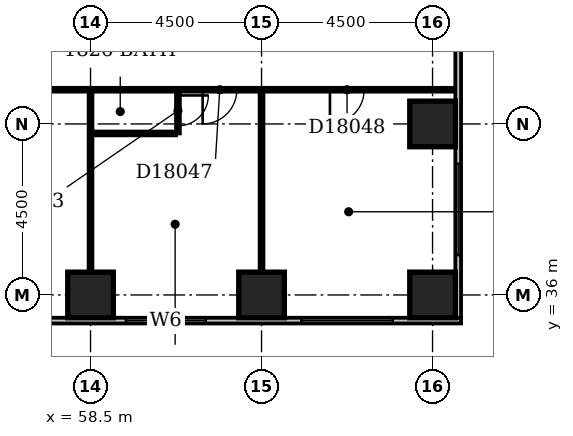
"""IFC4 building model, lengths in metres.
Left out: names, types, materials, properties, quantities, classifications, styles, units other than length and angle.
Written with IfcOpenShell. Run it as: python <this file> out.ifc"""

import sys

from ifc_helpers import new_model, si_unit, direction, frame, frame_2d, origin, origin_2d, place, context, subcontext, project, spatial, rectangle, extrude, element, fill, save


model = new_model("IFC4")
c1 = context("Model", 3, precision=1e-05, world=origin(), true_north=direction((0.0, 1.0)))
c2 = subcontext(c1, "Body", "Model", "MODEL_VIEW")
j1 = project(units=[si_unit("LENGTHUNIT", "METRE"), si_unit("PLANEANGLEUNIT", "RADIAN")], contexts=[c1])
p1 = place(None, origin())
s1 = spatial("IfcSite", under=j1, at=p1, CompositionType="ELEMENT")
p2 = place(p1, origin())
s2 = spatial("IfcBuilding", under=s1, at=p2, CompositionType="ELEMENT")
p3 = place(p2, frame((0.0, 0.0, 75.8)))
s3 = spatial("IfcBuildingStorey", under=s2, at=p3, CompositionType="ELEMENT", Elevation=75.8)
for number, where, z_axis, x_axis in (
    (1, (58.5, 36.0, -0.3), (0.0, 0.0, 1.0), (1.0, 0.0, 0.0)),
    (2, (63.0, 36.0, -0.3), (0.0, 0.0, 1.0), (1.0, 0.0, 0.0)),
    (3, (67.5, 36.0, -0.3), (0.0, 0.0, 1.0), (1.0, 0.0, 0.0)),
    (4, (67.5, 40.5, -0.3), (0.0, 0.0, 1.0), (1.0, 0.0, 0.0)),
):
    element("IfcColumn", number, at=place(p3, frame(where, z_axis=z_axis, x_axis=x_axis)), inside=s3, PredefinedType="COLUMN", context=c2, shape_type="SweptSolid", body=[
        extrude(rectangle(XDim=1.2, YDim=1.2, at=origin_2d()), origin(), (0.0, 0.0, 1.0), 3.6),
    ])
p4 = place(p3, frame((23.1, 35.325, 0.0), z_axis=(0.0, 0.0, 1.0), x_axis=(1.0, 0.0, 0.0)))
e5 = element("IfcWall", 5, at=p4, inside=s3, PredefinedType="STANDARD", context=c2, shape_type="SweptSolid", body=[
    extrude(rectangle(XDim=45.15, YDim=0.15, at=frame_2d((22.575, 0.0))), origin(), (0.0, 0.0, 1.0), 2.7),
])
p5 = place(p4, frame((0.45, 0.0, 0.6)))
e6 = element("IfcOpeningElement", 6, at=p5, cuts=e5, PredefinedType="OPENING", context=c2, shape_type="SweptSolid", body=[
    extrude(rectangle(XDim=2.4, YDim=1.8, at=frame_2d((1.2, 0.9))), frame((0.0, 0.087, 0.0), z_axis=(0.0, -1.0, 0.0), x_axis=(1.0, 0.0, 0.0)), (0.0, 0.0, 1.0), 0.174),
])
p6 = place(p4, frame((4.95, 0.0, 0.6)))
e7 = element("IfcOpeningElement", 7, at=p6, cuts=e5, PredefinedType="OPENING", context=c2, shape_type="SweptSolid", body=[
    extrude(rectangle(XDim=2.4, YDim=1.8, at=frame_2d((1.2, 0.9))), frame((0.0, 0.087, 0.0), z_axis=(0.0, -1.0, 0.0), x_axis=(1.0, 0.0, 0.0)), (0.0, 0.0, 1.0), 0.174),
])
p7 = place(p4, frame((10.548, 0.0, 0.6)))
e8 = element("IfcOpeningElement", 8, at=p7, cuts=e5, PredefinedType="OPENING", context=c2, shape_type="SweptSolid", body=[
    extrude(rectangle(XDim=1.5, YDim=1.8, at=frame_2d((0.75, 0.9))), frame((0.0, 0.087, 0.0), z_axis=(0.0, -1.0, 0.0), x_axis=(1.0, 0.0, 0.0)), (0.0, 0.0, 1.0), 0.174),
])
p8 = place(p4, frame((13.71, 0.0, 0.6)))
e9 = element("IfcOpeningElement", 9, at=p8, cuts=e5, PredefinedType="OPENING", context=c2, shape_type="SweptSolid", body=[
    extrude(rectangle(XDim=1.8, YDim=1.8, at=frame_2d((0.9, 0.9))), frame((0.0, 0.087, 0.0), z_axis=(0.0, -1.0, 0.0), x_axis=(1.0, 0.0, 0.0)), (0.0, 0.0, 1.0), 0.174),
])
p9 = place(p4, frame((18.45, 0.0, 0.6)))
e10 = element("IfcOpeningElement", 10, at=p9, cuts=e5, PredefinedType="OPENING", context=c2, shape_type="SweptSolid", body=[
    extrude(rectangle(XDim=2.4, YDim=1.8, at=frame_2d((1.2, 0.9))), frame((0.0, 0.087, 0.0), z_axis=(0.0, -1.0, 0.0), x_axis=(1.0, 0.0, 0.0)), (0.0, 0.0, 1.0), 0.174),
])
p10 = place(p4, frame((22.95, 0.0, 0.6)))
e11 = element("IfcOpeningElement", 11, at=p10, cuts=e5, PredefinedType="OPENING", context=c2, shape_type="SweptSolid", body=[
    extrude(rectangle(XDim=2.4, YDim=1.8, at=frame_2d((1.2, 0.9))), frame((0.0, 0.087, 0.0), z_axis=(0.0, -1.0, 0.0), x_axis=(1.0, 0.0, 0.0)), (0.0, 0.0, 1.0), 0.174),
])
p11 = place(p4, frame((27.45, 0.0, 0.6)))
e12 = element("IfcOpeningElement", 12, at=p11, cuts=e5, PredefinedType="OPENING", context=c2, shape_type="SweptSolid", body=[
    extrude(rectangle(XDim=2.4, YDim=1.8, at=frame_2d((1.2, 0.9))), frame((0.0, 0.087, 0.0), z_axis=(0.0, -1.0, 0.0), x_axis=(1.0, 0.0, 0.0)), (0.0, 0.0, 1.0), 0.174),
])
p12 = place(p4, frame((31.95, 0.0, 0.6)))
e13 = element("IfcOpeningElement", 13, at=p12, cuts=e5, PredefinedType="OPENING", context=c2, shape_type="SweptSolid", body=[
    extrude(rectangle(XDim=2.4, YDim=1.8, at=frame_2d((1.2, 0.9))), frame((0.0, 0.087, 0.0), z_axis=(0.0, -1.0, 0.0), x_axis=(1.0, 0.0, 0.0)), (0.0, 0.0, 1.0), 0.174),
])
p13 = place(p4, frame((36.331, 0.0, 0.6)))
e14 = element("IfcOpeningElement", 14, at=p13, cuts=e5, PredefinedType="OPENING", context=c2, shape_type="SweptSolid", body=[
    extrude(rectangle(XDim=2.1, YDim=1.8, at=frame_2d((1.05, 0.9))), frame((0.0, 0.087, 0.0), z_axis=(0.0, -1.0, 0.0), x_axis=(1.0, 0.0, 0.0)), (0.0, 0.0, 1.0), 0.174),
])
p14 = place(p4, frame((40.95, 0.0, 0.6)))
e15 = element("IfcOpeningElement", 15, at=p14, cuts=e5, PredefinedType="OPENING", context=c2, shape_type="SweptSolid", body=[
    extrude(rectangle(XDim=2.4, YDim=1.8, at=frame_2d((1.2, 0.9))), frame((0.0, 0.087, 0.0), z_axis=(0.0, -1.0, 0.0), x_axis=(1.0, 0.0, 0.0)), (0.0, 0.0, 1.0), 0.174),
])
p15 = place(p3, frame((68.175, 35.4, 0.0), z_axis=(0.0, 0.0, 1.0), x_axis=(0.0, 1.0, 0.0)))
e16 = element("IfcWall", 16, at=p15, inside=s3, PredefinedType="STANDARD", context=c2, shape_type="SweptSolid", body=[
    extrude(rectangle(XDim=23.85, YDim=0.15, at=frame_2d((11.925, 0.0))), origin(), (0.0, 0.0, 1.0), 2.7),
])
p16 = place(p15, frame((1.65, 0.0, 0.6)))
e17 = element("IfcOpeningElement", 17, at=p16, cuts=e16, PredefinedType="OPENING", context=c2, shape_type="SweptSolid", body=[
    extrude(rectangle(XDim=2.4, YDim=1.8, at=frame_2d((1.2, 0.9))), frame((0.0, 0.087, 0.0), z_axis=(0.0, -1.0, 0.0), x_axis=(1.0, 0.0, 0.0)), (0.0, 0.0, 1.0), 0.174),
])
p17 = place(p15, frame((11.49, 0.0, 0.6)))
e18 = element("IfcOpeningElement", 18, at=p17, cuts=e16, PredefinedType="OPENING", context=c2, shape_type="SweptSolid", body=[
    extrude(rectangle(XDim=1.8, YDim=1.8, at=frame_2d((0.9, 0.9))), frame((0.0, 0.087, 0.0), z_axis=(0.0, -1.0, 0.0), x_axis=(1.0, 0.0, 0.0)), (0.0, 0.0, 1.0), 0.174),
])
p18 = place(p15, frame((19.65, 0.0, 0.6)))
e19 = element("IfcOpeningElement", 19, at=p18, cuts=e16, PredefinedType="OPENING", context=c2, shape_type="SweptSolid", body=[
    extrude(rectangle(XDim=2.4, YDim=1.8, at=frame_2d((1.2, 0.9))), frame((0.0, 0.087, 0.0), z_axis=(0.0, -1.0, 0.0), x_axis=(1.0, 0.0, 0.0)), (0.0, 0.0, 1.0), 0.174),
])
p19 = place(p3, frame((58.5, 36.6, 0.0), z_axis=(0.0, 0.0, 1.0), x_axis=(0.0, 1.0, 0.0)))
e20 = element("IfcWall", 20, at=p19, inside=s3, PredefinedType="PARTITIONING", context=c2, shape_type="SweptSolid", body=[
    extrude(rectangle(XDim=4.75, YDim=0.1, at=frame_2d((2.375, 0.0))), origin(), (0.0, 0.0, 1.0), 3.3),
])
p20 = place(p3, frame((63.0, 36.6, 0.0), z_axis=(0.0, 0.0, 1.0), x_axis=(0.0, 1.0, 0.0)))
e21 = element("IfcWall", 21, at=p20, inside=s3, PredefinedType="PARTITIONING", context=c2, shape_type="SweptSolid", body=[
    extrude(rectangle(XDim=4.75, YDim=0.1, at=frame_2d((2.375, 0.0))), origin(), (0.0, 0.0, 1.0), 2.4),
])
p21 = place(p3, frame((58.55, 40.25, 0.0), z_axis=(0.0, 0.0, 1.0), x_axis=(1.0, 0.0, 0.0)))
e22 = element("IfcWall", 22, at=p21, inside=s3, PredefinedType="PLUMBINGWALL", context=c2, shape_type="SweptSolid", body=[
    extrude(rectangle(XDim=2.2, YDim=0.1, at=frame_2d((1.1, 0.0))), origin(), (0.0, 0.0, 1.0), 3.3),
])
p22 = place(p3, frame((60.8, 40.25, 0.0), z_axis=(0.0, 0.0, 1.0), x_axis=(0.0, 1.0, 0.0)))
e23 = element("IfcWall", 23, at=p22, inside=s3, PredefinedType="PLUMBINGWALL", context=c2, shape_type="SweptSolid", body=[
    extrude(rectangle(XDim=1.1, YDim=0.1, at=frame_2d((0.55, 0.0))), origin(), (0.0, 0.0, 1.0), 3.3),
])
p23 = place(p22, frame((0.2, 0.0, 0.0)))
e24 = element("IfcOpeningElement", 24, at=p23, cuts=e23, PredefinedType="OPENING", context=c2, shape_type="SweptSolid", body=[
    extrude(rectangle(XDim=0.8, YDim=2.1, at=frame_2d((0.4, 1.05))), frame((0.0, 0.062, 0.0), z_axis=(0.0, -1.0, 0.0), x_axis=(1.0, 0.0, 0.0)), (0.0, 0.0, 1.0), 0.124),
])
p24 = place(p3, frame((49.6, 41.4, 0.0), z_axis=(0.0, 0.0, 1.0), x_axis=(1.0, 0.0, 0.0)))
e25 = element("IfcWall", 25, at=p24, inside=s3, PredefinedType="PARTITIONING", context=c2, shape_type="SweptSolid", body=[
    extrude(rectangle(XDim=18.5, YDim=0.1, at=frame_2d((9.25, 0.0))), origin(), (0.0, 0.0, 1.0), 3.3),
])
p25 = place(p24, frame((1.7, 0.0, 0.0)))
e26 = element("IfcOpeningElement", 26, at=p25, cuts=e25, PredefinedType="OPENING", context=c2, shape_type="SweptSolid", body=[
    extrude(rectangle(XDim=0.9, YDim=2.1, at=frame_2d((0.45, 1.05))), frame((0.0, 0.062, 0.0), z_axis=(0.0, -1.0, 0.0), x_axis=(1.0, 0.0, 0.0)), (0.0, 0.0, 1.0), 0.124),
])
p26 = place(p24, frame((6.2, 0.0, 0.0)))
e27 = element("IfcOpeningElement", 27, at=p26, cuts=e25, PredefinedType="OPENING", context=c2, shape_type="SweptSolid", body=[
    extrude(rectangle(XDim=0.9, YDim=2.1, at=frame_2d((0.45, 1.05))), frame((0.0, 0.062, 0.0), z_axis=(0.0, -1.0, 0.0), x_axis=(1.0, 0.0, 0.0)), (0.0, 0.0, 1.0), 0.124),
])
p27 = place(p24, frame((11.85, 0.0, 0.0)))
e28 = element("IfcOpeningElement", 28, at=p27, cuts=e25, PredefinedType="OPENING", context=c2, shape_type="SweptSolid", body=[
    extrude(rectangle(XDim=0.9, YDim=2.1, at=frame_2d((0.45, 1.05))), frame((0.0, 0.062, 0.0), z_axis=(0.0, -1.0, 0.0), x_axis=(1.0, 0.0, 0.0)), (0.0, 0.0, 1.0), 0.124),
])
p28 = place(p24, frame((15.2, 0.0, 0.0)))
e29 = element("IfcOpeningElement", 29, at=p28, cuts=e25, PredefinedType="OPENING", context=c2, shape_type="SweptSolid", body=[
    extrude(rectangle(XDim=0.9, YDim=2.1, at=frame_2d((0.45, 1.05))), frame((0.0, 0.062, 0.0), z_axis=(0.0, -1.0, 0.0), x_axis=(1.0, 0.0, 0.0)), (0.0, 0.0, 1.0), 0.124),
])
p29 = place(p13, origin())
e30 = element("IfcWindow", 30, at=p29, inside=s3, PartitioningType="SINGLE_PANEL", PredefinedType="WINDOW", context=c2, shape_type="SweptSolid", body=[
    extrude(rectangle(XDim=2.1, YDim=1.8, at=frame_2d((1.05, 0.9))), frame((0.0, 0.03, 0.0), z_axis=(0.0, -1.0, 0.0), x_axis=(1.0, 0.0, 0.0)), (0.0, 0.0, 1.0), 0.06),
])
fill(e14, e30)
p30 = place(p14, origin())
e31 = element("IfcWindow", 31, at=p30, inside=s3, PartitioningType="SINGLE_PANEL", PredefinedType="WINDOW", context=c2, shape_type="SweptSolid", body=[
    extrude(rectangle(XDim=2.4, YDim=1.8, at=frame_2d((1.2, 0.9))), frame((0.0, 0.03, 0.0), z_axis=(0.0, -1.0, 0.0), x_axis=(1.0, 0.0, 0.0)), (0.0, 0.0, 1.0), 0.06),
])
fill(e15, e31)
p31 = place(p16, origin())
e32 = element("IfcWindow", 32, at=p31, inside=s3, PartitioningType="SINGLE_PANEL", PredefinedType="WINDOW", context=c2, shape_type="SweptSolid", body=[
    extrude(rectangle(XDim=2.4, YDim=1.8, at=frame_2d((1.2, 0.9))), frame((0.0, 0.03, 0.0), z_axis=(0.0, -1.0, 0.0), x_axis=(1.0, 0.0, 0.0)), (0.0, 0.0, 1.0), 0.06),
])
fill(e17, e32)
p32 = place(p23, origin())
e33 = element("IfcDoor", 33, at=p32, inside=s3, OperationType="SINGLE_SWING_RIGHT", PredefinedType="DOOR", context=c2, shape_type="SweptSolid", body=[
    extrude(rectangle(XDim=0.8, YDim=2.1, at=frame_2d((0.4, 1.05))), frame((0.0, 0.025, 0.0), z_axis=(0.0, -1.0, 0.0), x_axis=(1.0, 0.0, 0.0)), (0.0, 0.0, 1.0), 0.05),
])
fill(e24, e33)
p33 = place(p27, frame((0.9, 0.0, 0.0), z_axis=(0.0, 0.0, 1.0), x_axis=(-1.0, 0.0, 0.0)))
e34 = element("IfcDoor", 34, at=p33, inside=s3, OperationType="SINGLE_SWING_RIGHT", PredefinedType="DOOR", context=c2, shape_type="SweptSolid", body=[
    extrude(rectangle(XDim=0.9, YDim=2.1, at=frame_2d((0.45, 1.05))), frame((0.0, 0.025, 0.0), z_axis=(0.0, -1.0, 0.0), x_axis=(1.0, 0.0, 0.0)), (0.0, 0.0, 1.0), 0.05),
])
fill(e28, e34)
p34 = place(p28, frame((0.9, 0.0, 0.0), z_axis=(0.0, 0.0, 1.0), x_axis=(-1.0, 0.0, 0.0)))
e35 = element("IfcDoor", 35, at=p34, inside=s3, OperationType="SINGLE_SWING_RIGHT", PredefinedType="DOOR", context=c2, shape_type="SweptSolid", body=[
    extrude(rectangle(XDim=0.9, YDim=2.1, at=frame_2d((0.45, 1.05))), frame((0.0, 0.025, 0.0), z_axis=(0.0, -1.0, 0.0), x_axis=(1.0, 0.0, 0.0)), (0.0, 0.0, 1.0), 0.05),
])
fill(e29, e35)
save(model, sys.argv[1])
